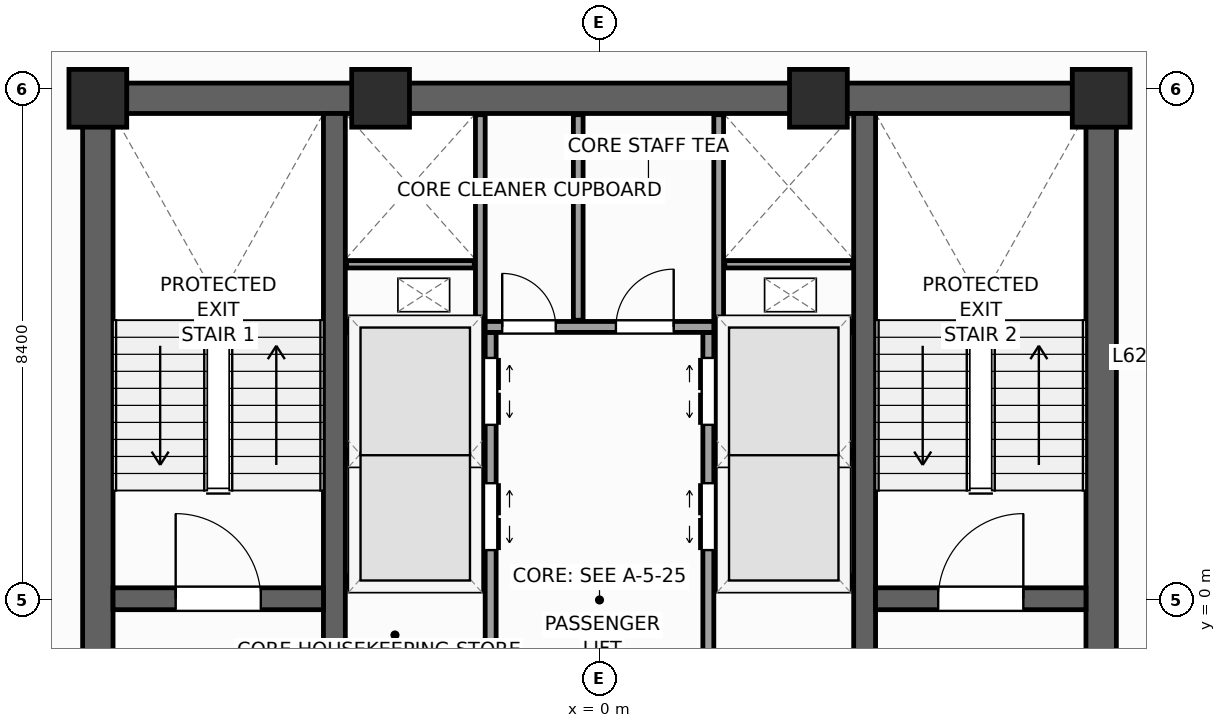
"""IFC4 building model, lengths in metres.
Left out: names, types, materials, properties, quantities, classifications, styles, units other than length and angle.
Written with IfcOpenShell. Run it as: python <this file> out.ifc"""

import sys

from ifc_helpers import new_model, si_unit, direction, frame, frame_2d, origin, origin_2d, place, context, subcontext, project, spatial, rectangle, extrude, source, transform, mapped, element, fill, save


model = new_model("IFC4")
c1 = context("Model", 3, precision=1e-05, world=origin(), true_north=direction((0.0, 1.0)))
c2 = subcontext(c1, "Body", "Model", "MODEL_VIEW")
j1 = project(units=[si_unit("LENGTHUNIT", "METRE"), si_unit("PLANEANGLEUNIT", "RADIAN")], contexts=[c1])
p1 = place(None, origin())
s1 = spatial("IfcSite", under=j1, at=p1, CompositionType="ELEMENT")
p2 = place(p1, origin())
s2 = spatial("IfcBuilding", under=s1, at=p2, CompositionType="ELEMENT")
p3 = place(p2, frame((0.0, 0.0, 256.3)))
s3 = spatial("IfcBuildingStorey", under=s2, at=p3, CompositionType="ELEMENT", Elevation=256.3)
p4 = place(p3, frame((-8.5, 8.25, 0.0), z_axis=(0.0, 0.0, 1.0), x_axis=(1.0, 0.0, 0.0)))
e1 = element("IfcWall", 1, at=p4, inside=s3, PredefinedType="SHEAR", context=c2, shape_type="SweptSolid", body=[
    extrude(rectangle(XDim=17.0, YDim=0.5, at=frame_2d((8.5, 0.0))), origin(), (0.0, 0.0, 1.0), 3.9),
])
p5 = place(p3, frame((-8.25, -8.0, 0.0), z_axis=(0.0, 0.0, 1.0), x_axis=(0.0, 1.0, 0.0)))
e2 = element("IfcWall", 2, at=p5, inside=s3, PredefinedType="SHEAR", context=c2, shape_type="SweptSolid", body=[
    extrude(rectangle(XDim=16.0, YDim=0.5, at=frame_2d((8.0, 0.0))), origin(), (0.0, 0.0, 1.0), 3.9),
])
p6 = place(p5, frame((4.69, 0.0, 0.0)))
e3 = element("IfcOpeningElement", 3, at=p6, cuts=e2, PredefinedType="OPENING", context=c2, shape_type="SweptSolid", body=[
    extrude(rectangle(XDim=1.3, YDim=2.2, at=frame_2d((0.65, 1.1))), frame((0.0, 0.26, 0.0), z_axis=(0.0, -1.0, 0.0), x_axis=(1.0, 0.0, 0.0)), (0.0, 0.0, 1.0), 0.52),
])
p7 = place(p3, frame((8.25, -8.0, 0.0), z_axis=(0.0, 0.0, 1.0), x_axis=(0.0, 1.0, 0.0)))
e4 = element("IfcWall", 4, at=p7, inside=s3, PredefinedType="SHEAR", context=c2, shape_type="SweptSolid", body=[
    extrude(rectangle(XDim=16.0, YDim=0.5, at=frame_2d((8.0, 0.0))), origin(), (0.0, 0.0, 1.0), 3.9),
])
p8 = place(p7, frame((4.69, 0.0, 0.0)))
e5 = element("IfcOpeningElement", 5, at=p8, cuts=e4, PredefinedType="OPENING", context=c2, shape_type="SweptSolid", body=[
    extrude(rectangle(XDim=1.3, YDim=2.2, at=frame_2d((0.65, 1.1))), frame((0.0, 0.26, 0.0), z_axis=(0.0, -1.0, 0.0), x_axis=(1.0, 0.0, 0.0)), (0.0, 0.0, 1.0), 0.52),
])
for number, where, z_axis, x_axis in (
    (6, (-4.36, -8.0, 0.0), (0.0, 0.0, 1.0), (0.0, 1.0, 0.0)),
    (7, (4.36, -8.0, 0.0), (0.0, 0.0, 1.0), (0.0, 1.0, 0.0)),
):
    element("IfcWall", number, at=place(p3, frame(where, z_axis=z_axis, x_axis=x_axis)), inside=s3, PredefinedType="SHEAR", context=c2, shape_type="SweptSolid", body=[
        extrude(rectangle(XDim=16.0, YDim=0.36, at=frame_2d((8.0, 0.0))), origin(), (0.0, 0.0, 1.0), 3.9),
    ])
p9 = place(p3, frame((-8.0, 0.02, 0.0), z_axis=(0.0, 0.0, 1.0), x_axis=(1.0, 0.0, 0.0)))
e8 = element("IfcWall", 8, at=p9, inside=s3, PredefinedType="SHEAR", context=c2, shape_type="SweptSolid", body=[
    extrude(rectangle(XDim=3.46, YDim=0.36, at=frame_2d((1.73, 0.0))), origin(), (0.0, 0.0, 1.0), 3.9),
])
p10 = place(p9, frame((1.03, 0.0, 0.0)))
e9 = element("IfcOpeningElement", 9, at=p10, cuts=e8, PredefinedType="OPENING", context=c2, shape_type="SweptSolid", body=[
    extrude(rectangle(XDim=1.4, YDim=2.2, at=frame_2d((0.7, 1.1))), frame((0.0, 0.19, 0.0), z_axis=(0.0, -1.0, 0.0), x_axis=(1.0, 0.0, 0.0)), (0.0, 0.0, 1.0), 0.38),
])
p11 = place(p3, frame((4.54, 0.02, 0.0), z_axis=(0.0, 0.0, 1.0), x_axis=(1.0, 0.0, 0.0)))
e10 = element("IfcWall", 10, at=p11, inside=s3, PredefinedType="SHEAR", context=c2, shape_type="SweptSolid", body=[
    extrude(rectangle(XDim=3.46, YDim=0.36, at=frame_2d((1.73, 0.0))), origin(), (0.0, 0.0, 1.0), 3.9),
])
p12 = place(p11, frame((1.03, 0.0, 0.0)))
e11 = element("IfcOpeningElement", 11, at=p12, cuts=e10, PredefinedType="OPENING", context=c2, shape_type="SweptSolid", body=[
    extrude(rectangle(XDim=1.4, YDim=2.2, at=frame_2d((0.7, 1.1))), frame((0.0, 0.19, 0.0), z_axis=(0.0, -1.0, 0.0), x_axis=(1.0, 0.0, 0.0)), (0.0, 0.0, 1.0), 0.38),
])
m1 = source(origin(), c2, "Body", "SweptSolid", [
    extrude(rectangle(XDim=0.95, YDim=0.95, at=origin_2d()), origin(), (0.0, 0.0, 1.0), 3.9),
])
for number, where, z_axis, x_axis in (
    (12, (8.25, 8.25, 0.0), (0.0, 0.0, 1.0), (1.0, 0.0, 0.0)),
    (13, (-8.25, 8.25, 0.0), (0.0, 0.0, 1.0), (1.0, 0.0, 0.0)),
    (14, (-3.6, 8.25, 0.0), (0.0, 0.0, 1.0), (1.0, 0.0, 0.0)),
    (15, (3.6, 8.25, 0.0), (0.0, 0.0, 1.0), (1.0, 0.0, 0.0)),
):
    element("IfcColumn", number, at=place(p3, frame(where, z_axis=z_axis, x_axis=x_axis)), inside=s3, PredefinedType="PILASTER", context=c2, shape_type="MappedRepresentation", body=[
        mapped(m1, transform((0.0, 0.0, 0.0), scale=1.0)),
    ])
p13 = place(p3, frame((6.733, -29.154, 0.0), z_axis=(0.0, 0.0, 1.0), x_axis=(0.629325378072, 0.77714192302, 0.0)))
e16 = element("IfcWall", 16, at=p13, inside=s3, PredefinedType="STANDARD", context=c2, shape_type="SweptSolid", body=[
    extrude(rectangle(XDim=36.84, YDim=0.34, at=frame_2d((18.42, 0.0))), origin(), (0.0, 0.0, 1.0), 2.02),
])
p14 = place(p13, frame((23.495, 0.0, 0.0)))
e17 = element("IfcOpeningElement", 17, at=p14, cuts=e16, PredefinedType="OPENING", context=c2, shape_type="SweptSolid", body=[
    extrude(rectangle(XDim=1.05, YDim=2.02, at=frame_2d((0.525, 1.01))), frame((0.0, 0.18, 0.0), z_axis=(0.0, -1.0, 0.0), x_axis=(1.0, 0.0, 0.0)), (0.0, 0.0, 1.0), 0.36),
])
p15 = place(p13, frame((3.421, 0.0, 0.49)))
e18 = element("IfcOpeningElement", 18, at=p15, cuts=e16, PredefinedType="OPENING", context=c2, shape_type="SweptSolid", body=[
    extrude(rectangle(XDim=2.0, YDim=1.45, at=frame_2d((1.0, 0.725))), frame((0.0, 0.18, 0.0), z_axis=(0.0, -1.0, 0.0), x_axis=(1.0, 0.0, 0.0)), (0.0, 0.0, 1.0), 0.36),
])
p16 = place(p13, frame((11.184, 0.0, 0.49)))
e19 = element("IfcOpeningElement", 19, at=p16, cuts=e16, PredefinedType="OPENING", context=c2, shape_type="SweptSolid", body=[
    extrude(rectangle(XDim=2.0, YDim=1.45, at=frame_2d((1.0, 0.725))), frame((0.0, 0.18, 0.0), z_axis=(0.0, -1.0, 0.0), x_axis=(1.0, 0.0, 0.0)), (0.0, 0.0, 1.0), 0.36),
])
p17 = place(p13, frame((15.183, 0.0, 0.49)))
e20 = element("IfcOpeningElement", 20, at=p17, cuts=e16, PredefinedType="OPENING", context=c2, shape_type="SweptSolid", body=[
    extrude(rectangle(XDim=2.0, YDim=1.45, at=frame_2d((1.0, 0.725))), frame((0.0, 0.18, 0.0), z_axis=(0.0, -1.0, 0.0), x_axis=(1.0, 0.0, 0.0)), (0.0, 0.0, 1.0), 0.36),
])
p18 = place(p13, frame((26.301, 0.0, 0.49)))
e21 = element("IfcOpeningElement", 21, at=p18, cuts=e16, PredefinedType="OPENING", context=c2, shape_type="SweptSolid", body=[
    extrude(rectangle(XDim=2.0, YDim=1.45, at=frame_2d((1.0, 0.725))), frame((0.0, 0.18, 0.0), z_axis=(0.0, -1.0, 0.0), x_axis=(1.0, 0.0, 0.0)), (0.0, 0.0, 1.0), 0.36),
])
p19 = place(p13, frame((30.682, 0.0, 0.49)))
e22 = element("IfcOpeningElement", 22, at=p19, cuts=e16, PredefinedType="OPENING", context=c2, shape_type="SweptSolid", body=[
    extrude(rectangle(XDim=2.0, YDim=1.45, at=frame_2d((1.0, 0.725))), frame((0.0, 0.18, 0.0), z_axis=(0.0, -1.0, 0.0), x_axis=(1.0, 0.0, 0.0)), (0.0, 0.0, 1.0), 0.36),
])
p20 = place(p3, frame((29.154, 6.733, 0.0), z_axis=(0.0, 0.0, 1.0), x_axis=(-0.77714192302, 0.629325378072, 0.0)))
e23 = element("IfcWall", 23, at=p20, inside=s3, PredefinedType="STANDARD", context=c2, shape_type="SweptSolid", body=[
    extrude(rectangle(XDim=36.84, YDim=0.34, at=frame_2d((18.42, 0.0))), origin(), (0.0, 0.0, 1.0), 2.02),
])
p21 = place(p20, frame((3.421, 0.0, 0.49)))
e24 = element("IfcOpeningElement", 24, at=p21, cuts=e23, PredefinedType="OPENING", context=c2, shape_type="SweptSolid", body=[
    extrude(rectangle(XDim=2.0, YDim=1.45, at=frame_2d((1.0, 0.725))), frame((0.0, 0.18, 0.0), z_axis=(0.0, -1.0, 0.0), x_axis=(1.0, 0.0, 0.0)), (0.0, 0.0, 1.0), 0.36),
])
p22 = place(p20, frame((9.684, 0.0, 0.49)))
e25 = element("IfcOpeningElement", 25, at=p22, cuts=e23, PredefinedType="OPENING", context=c2, shape_type="SweptSolid", body=[
    extrude(rectangle(XDim=2.0, YDim=1.45, at=frame_2d((1.0, 0.725))), frame((0.0, 0.18, 0.0), z_axis=(0.0, -1.0, 0.0), x_axis=(1.0, 0.0, 0.0)), (0.0, 0.0, 1.0), 0.36),
])
p23 = place(p20, frame((15.183, 0.0, 0.49)))
e26 = element("IfcOpeningElement", 26, at=p23, cuts=e23, PredefinedType="OPENING", context=c2, shape_type="SweptSolid", body=[
    extrude(rectangle(XDim=2.0, YDim=1.45, at=frame_2d((1.0, 0.725))), frame((0.0, 0.18, 0.0), z_axis=(0.0, -1.0, 0.0), x_axis=(1.0, 0.0, 0.0)), (0.0, 0.0, 1.0), 0.36),
])
p24 = place(p20, frame((24.051, 0.0, 0.49)))
e27 = element("IfcOpeningElement", 27, at=p24, cuts=e23, PredefinedType="OPENING", context=c2, shape_type="SweptSolid", body=[
    extrude(rectangle(XDim=2.0, YDim=1.45, at=frame_2d((1.0, 0.725))), frame((0.0, 0.18, 0.0), z_axis=(0.0, -1.0, 0.0), x_axis=(1.0, 0.0, 0.0)), (0.0, 0.0, 1.0), 0.36),
])
p25 = place(p20, frame((31.432, 0.0, 0.49)))
e28 = element("IfcOpeningElement", 28, at=p25, cuts=e23, PredefinedType="OPENING", context=c2, shape_type="SweptSolid", body=[
    extrude(rectangle(XDim=2.0, YDim=1.45, at=frame_2d((1.0, 0.725))), frame((0.0, 0.18, 0.0), z_axis=(0.0, -1.0, 0.0), x_axis=(1.0, 0.0, 0.0)), (0.0, 0.0, 1.0), 0.36),
])
p26 = place(p3, frame((-6.733, 29.154, 0.0), z_axis=(0.0, 0.0, 1.0), x_axis=(-0.629325378072, -0.77714192302, 0.0)))
e29 = element("IfcWall", 29, at=p26, inside=s3, PredefinedType="STANDARD", context=c2, shape_type="SweptSolid", body=[
    extrude(rectangle(XDim=36.84, YDim=0.34, at=frame_2d((18.42, 0.0))), origin(), (0.0, 0.0, 1.0), 2.02),
])
p27 = place(p26, frame((23.495, 0.0, 0.0)))
e30 = element("IfcOpeningElement", 30, at=p27, cuts=e29, PredefinedType="OPENING", context=c2, shape_type="SweptSolid", body=[
    extrude(rectangle(XDim=1.05, YDim=2.02, at=frame_2d((0.525, 1.01))), frame((0.0, 0.18, 0.0), z_axis=(0.0, -1.0, 0.0), x_axis=(1.0, 0.0, 0.0)), (0.0, 0.0, 1.0), 0.36),
])
p28 = place(p26, frame((3.421, 0.0, 0.49)))
e31 = element("IfcOpeningElement", 31, at=p28, cuts=e29, PredefinedType="OPENING", context=c2, shape_type="SweptSolid", body=[
    extrude(rectangle(XDim=2.0, YDim=1.45, at=frame_2d((1.0, 0.725))), frame((0.0, 0.18, 0.0), z_axis=(0.0, -1.0, 0.0), x_axis=(1.0, 0.0, 0.0)), (0.0, 0.0, 1.0), 0.36),
])
p29 = place(p26, frame((11.184, 0.0, 0.49)))
e32 = element("IfcOpeningElement", 32, at=p29, cuts=e29, PredefinedType="OPENING", context=c2, shape_type="SweptSolid", body=[
    extrude(rectangle(XDim=2.0, YDim=1.45, at=frame_2d((1.0, 0.725))), frame((0.0, 0.18, 0.0), z_axis=(0.0, -1.0, 0.0), x_axis=(1.0, 0.0, 0.0)), (0.0, 0.0, 1.0), 0.36),
])
p30 = place(p26, frame((15.183, 0.0, 0.49)))
e33 = element("IfcOpeningElement", 33, at=p30, cuts=e29, PredefinedType="OPENING", context=c2, shape_type="SweptSolid", body=[
    extrude(rectangle(XDim=2.0, YDim=1.45, at=frame_2d((1.0, 0.725))), frame((0.0, 0.18, 0.0), z_axis=(0.0, -1.0, 0.0), x_axis=(1.0, 0.0, 0.0)), (0.0, 0.0, 1.0), 0.36),
])
p31 = place(p26, frame((26.301, 0.0, 0.49)))
e34 = element("IfcOpeningElement", 34, at=p31, cuts=e29, PredefinedType="OPENING", context=c2, shape_type="SweptSolid", body=[
    extrude(rectangle(XDim=2.0, YDim=1.45, at=frame_2d((1.0, 0.725))), frame((0.0, 0.18, 0.0), z_axis=(0.0, -1.0, 0.0), x_axis=(1.0, 0.0, 0.0)), (0.0, 0.0, 1.0), 0.36),
])
p32 = place(p26, frame((29.182, 0.0, 0.49)))
e35 = element("IfcOpeningElement", 35, at=p32, cuts=e29, PredefinedType="OPENING", context=c2, shape_type="SweptSolid", body=[
    extrude(rectangle(XDim=2.0, YDim=1.45, at=frame_2d((1.0, 0.725))), frame((0.0, 0.18, 0.0), z_axis=(0.0, -1.0, 0.0), x_axis=(1.0, 0.0, 0.0)), (0.0, 0.0, 1.0), 0.36),
])
p33 = place(p3, frame((-1.79, -7.98, 0.0), z_axis=(0.0, 0.0, 1.0), x_axis=(0.0, 1.0, 0.0)))
e36 = element("IfcWall", 36, at=p33, inside=s3, PredefinedType="PARTITIONING", context=c2, shape_type="SweptSolid", body=[
    extrude(rectangle(XDim=12.38, YDim=0.18, at=frame_2d((6.19, 0.0))), origin(), (0.0, 0.0, 1.0), 3.5),
])
p34 = place(p33, frame((8.8, 0.0, 0.0)))
e37 = element("IfcOpeningElement", 37, at=p34, cuts=e36, PredefinedType="OPENING", context=c2, shape_type="SweptSolid", body=[
    extrude(rectangle(XDim=1.1, YDim=2.2, at=frame_2d((0.55, 1.1))), frame((0.0, 0.1, 0.0), z_axis=(0.0, -1.0, 0.0), x_axis=(1.0, 0.0, 0.0)), (0.0, 0.0, 1.0), 0.2),
])
p35 = place(p33, frame((10.86, 0.0, 0.0)))
e38 = element("IfcOpeningElement", 38, at=p35, cuts=e36, PredefinedType="OPENING", context=c2, shape_type="SweptSolid", body=[
    extrude(rectangle(XDim=1.1, YDim=2.2, at=frame_2d((0.55, 1.1))), frame((0.0, 0.1, 0.0), z_axis=(0.0, -1.0, 0.0), x_axis=(1.0, 0.0, 0.0)), (0.0, 0.0, 1.0), 0.2),
])
p36 = place(p33, frame((1.4, 0.0, 0.0)))
e39 = element("IfcOpeningElement", 39, at=p36, cuts=e36, PredefinedType="OPENING", context=c2, shape_type="SweptSolid", body=[
    extrude(rectangle(XDim=1.15, YDim=2.25, at=frame_2d((0.575, 1.125))), frame((0.0, 0.1, 0.0), z_axis=(0.0, -1.0, 0.0), x_axis=(1.0, 0.0, 0.0)), (0.0, 0.0, 1.0), 0.2),
])
p37 = place(p33, frame((5.6, 0.0, 0.0)))
e40 = element("IfcOpeningElement", 40, at=p37, cuts=e36, PredefinedType="OPENING", context=c2, shape_type="SweptSolid", body=[
    extrude(rectangle(XDim=1.15, YDim=2.25, at=frame_2d((0.575, 1.125))), frame((0.0, 0.1, 0.0), z_axis=(0.0, -1.0, 0.0), x_axis=(1.0, 0.0, 0.0)), (0.0, 0.0, 1.0), 0.2),
])
p38 = place(p3, frame((1.79, -7.98, 0.0), z_axis=(0.0, 0.0, 1.0), x_axis=(0.0, 1.0, 0.0)))
e41 = element("IfcWall", 41, at=p38, inside=s3, PredefinedType="PARTITIONING", context=c2, shape_type="SweptSolid", body=[
    extrude(rectangle(XDim=12.38, YDim=0.18, at=frame_2d((6.19, 0.0))), origin(), (0.0, 0.0, 1.0), 3.5),
])
p39 = place(p38, frame((8.8, 0.0, 0.0)))
e42 = element("IfcOpeningElement", 42, at=p39, cuts=e41, PredefinedType="OPENING", context=c2, shape_type="SweptSolid", body=[
    extrude(rectangle(XDim=1.1, YDim=2.2, at=frame_2d((0.55, 1.1))), frame((0.0, 0.1, 0.0), z_axis=(0.0, -1.0, 0.0), x_axis=(1.0, 0.0, 0.0)), (0.0, 0.0, 1.0), 0.2),
])
p40 = place(p38, frame((10.86, 0.0, 0.0)))
e43 = element("IfcOpeningElement", 43, at=p40, cuts=e41, PredefinedType="OPENING", context=c2, shape_type="SweptSolid", body=[
    extrude(rectangle(XDim=1.1, YDim=2.2, at=frame_2d((0.55, 1.1))), frame((0.0, 0.1, 0.0), z_axis=(0.0, -1.0, 0.0), x_axis=(1.0, 0.0, 0.0)), (0.0, 0.0, 1.0), 0.2),
])
p41 = place(p38, frame((3.5, 0.0, 0.0)))
e44 = element("IfcOpeningElement", 44, at=p41, cuts=e41, PredefinedType="OPENING", context=c2, shape_type="SweptSolid", body=[
    extrude(rectangle(XDim=1.15, YDim=2.25, at=frame_2d((0.575, 1.125))), frame((0.0, 0.1, 0.0), z_axis=(0.0, -1.0, 0.0), x_axis=(1.0, 0.0, 0.0)), (0.0, 0.0, 1.0), 0.2),
])
p42 = place(p3, frame((-1.88, 4.49, 0.0), z_axis=(0.0, 0.0, 1.0), x_axis=(1.0, 0.0, 0.0)))
e45 = element("IfcWall", 45, at=p42, inside=s3, PredefinedType="PARTITIONING", context=c2, shape_type="SweptSolid", body=[
    extrude(rectangle(XDim=3.76, YDim=0.18, at=frame_2d((1.88, 0.0))), origin(), (0.0, 0.0, 1.0), 3.5),
])
p43 = place(p42, frame((0.28, 0.0, 0.0)))
e46 = element("IfcOpeningElement", 46, at=p43, cuts=e45, PredefinedType="OPENING", context=c2, shape_type="SweptSolid", body=[
    extrude(rectangle(XDim=0.88, YDim=2.1, at=frame_2d((0.44, 1.05))), frame((0.0, 0.1, 0.0), z_axis=(0.0, -1.0, 0.0), x_axis=(1.0, 0.0, 0.0)), (0.0, 0.0, 1.0), 0.2),
])
p44 = place(p42, frame((2.15, 0.0, 0.0)))
e47 = element("IfcOpeningElement", 47, at=p44, cuts=e45, PredefinedType="OPENING", context=c2, shape_type="SweptSolid", body=[
    extrude(rectangle(XDim=0.95, YDim=2.1, at=frame_2d((0.475, 1.05))), frame((0.0, 0.1, 0.0), z_axis=(0.0, -1.0, 0.0), x_axis=(1.0, 0.0, 0.0)), (0.0, 0.0, 1.0), 0.2),
])
for number, where, z_axis, x_axis in (
    (48, (-4.17, 0.3, 0.0), (0.0, 0.0, 1.0), (1.0, 0.0, 0.0)),
    (49, (1.89, 0.3, 0.0), (0.0, 0.0, 1.0), (1.0, 0.0, 0.0)),
    (50, (-4.17, 4.49, 0.0), (0.0, 0.0, 1.0), (1.0, 0.0, 0.0)),
    (51, (1.89, 4.49, 0.0), (0.0, 0.0, 1.0), (1.0, 0.0, 0.0)),
):
    element("IfcWall", number, at=place(p3, frame(where, z_axis=z_axis, x_axis=x_axis)), inside=s3, PredefinedType="PARTITIONING", context=c2, shape_type="SweptSolid", body=[
        extrude(rectangle(XDim=2.28, YDim=0.18, at=frame_2d((1.14, 0.0))), origin(), (0.0, 0.0, 1.0), 3.5),
    ])
for number, where, z_axis, x_axis in (
    (52, (-4.16, 2.4, 0.0), (0.0, 0.0, 1.0), (1.0, 0.0, 0.0)),
    (53, (1.9, 2.4, 0.0), (0.0, 0.0, 1.0), (1.0, 0.0, 0.0)),
):
    element("IfcWall", number, at=place(p3, frame(where, z_axis=z_axis, x_axis=x_axis)), inside=s3, PredefinedType="PARTITIONING", context=c2, shape_type="SweptSolid", body=[
        extrude(rectangle(XDim=2.26, YDim=0.12, at=frame_2d((1.13, 0.0))), origin(), (0.0, 0.0, 1.0), 3.5),
    ])
for number, where, z_axis, x_axis in (
    (54, (-1.96, 4.58, 0.0), (0.0, 0.0, 1.0), (0.0, 1.0, 0.0)),
    (55, (1.96, 4.58, 0.0), (0.0, 0.0, 1.0), (0.0, 1.0, 0.0)),
):
    element("IfcWall", number, at=place(p3, frame(where, z_axis=z_axis, x_axis=x_axis)), inside=s3, PredefinedType="PARTITIONING", context=c2, shape_type="SweptSolid", body=[
        extrude(rectangle(XDim=3.4, YDim=0.16, at=frame_2d((1.7, 0.0))), origin(), (0.0, 0.0, 1.0), 3.5),
    ])
for number, where, z_axis, x_axis in (
    (56, (-4.16, 5.52, 0.0), (0.0, 0.0, 1.0), (1.0, 0.0, 0.0)),
    (57, (2.06, 5.52, 0.0), (0.0, 0.0, 1.0), (1.0, 0.0, 0.0)),
):
    element("IfcWall", number, at=place(p3, frame(where, z_axis=z_axis, x_axis=x_axis)), inside=s3, PredefinedType="PARTITIONING", context=c2, shape_type="SweptSolid", body=[
        extrude(rectangle(XDim=2.1, YDim=0.12, at=frame_2d((1.05, 0.0))), origin(), (0.0, 0.0, 1.0), 3.5),
    ])
p45 = place(p3, frame((-0.35, 4.6, 0.0), z_axis=(0.0, 0.0, 1.0), x_axis=(0.0, 1.0, 0.0)))
e58 = element("IfcWall", 58, at=p45, inside=s3, PredefinedType="PARTITIONING", context=c2, shape_type="SweptSolid", body=[
    extrude(rectangle(XDim=3.38, YDim=0.16, at=frame_2d((1.69, 0.0))), origin(), (0.0, 0.0, 1.0), 3.5),
])
m2 = source(origin(), c2, "Body", "SweptSolid", [
    extrude(rectangle(XDim=1.4, YDim=2.2, at=frame_2d((0.7, 1.1))), frame((0.0, 0.025, 0.0), z_axis=(0.0, -1.0, 0.0), x_axis=(1.0, 0.0, 0.0)), (0.0, 0.0, 1.0), 0.05),
])
p46 = place(p10, origin())
e59 = element("IfcDoor", 59, at=p46, inside=s3, OperationType="SINGLE_SWING_LEFT", PredefinedType="DOOR", context=c2, shape_type="MappedRepresentation", body=[
    mapped(m2, transform((0.0, 0.0, 0.0), scale=1.0)),
])
fill(e9, e59)
p47 = place(p12, origin())
e60 = element("IfcDoor", 60, at=p47, inside=s3, OperationType="SINGLE_SWING_RIGHT", PredefinedType="DOOR", context=c2, shape_type="MappedRepresentation", body=[
    mapped(m2, transform((0.0, 0.0, 0.0), scale=1.0)),
])
fill(e11, e60)
m3 = source(origin(), c2, "Body", "SweptSolid", [
    extrude(rectangle(XDim=1.1, YDim=2.2, at=frame_2d((0.55, 1.1))), frame((0.0, 0.025, 0.0), z_axis=(0.0, -1.0, 0.0), x_axis=(1.0, 0.0, 0.0)), (0.0, 0.0, 1.0), 0.05),
])
p48 = place(p34, frame((1.1, 0.0, 0.0), z_axis=(0.0, 0.0, 1.0), x_axis=(-1.0, 0.0, 0.0)))
e61 = element("IfcDoor", 61, at=p48, inside=s3, OperationType="DOUBLE_DOOR_SLIDING", PredefinedType="DOOR", context=c2, shape_type="MappedRepresentation", body=[
    mapped(m3, transform((0.0, 0.0, 0.0), scale=1.0)),
])
fill(e37, e61)
p49 = place(p35, frame((1.1, 0.0, 0.0), z_axis=(0.0, 0.0, 1.0), x_axis=(-1.0, 0.0, 0.0)))
e62 = element("IfcDoor", 62, at=p49, inside=s3, OperationType="DOUBLE_DOOR_SLIDING", PredefinedType="DOOR", context=c2, shape_type="MappedRepresentation", body=[
    mapped(m3, transform((0.0, 0.0, 0.0), scale=1.0)),
])
fill(e38, e62)
p50 = place(p39, origin())
e63 = element("IfcDoor", 63, at=p50, inside=s3, OperationType="DOUBLE_DOOR_SLIDING", PredefinedType="DOOR", context=c2, shape_type="MappedRepresentation", body=[
    mapped(m3, transform((0.0, 0.0, 0.0), scale=1.0)),
])
fill(e42, e63)
p51 = place(p40, origin())
e64 = element("IfcDoor", 64, at=p51, inside=s3, OperationType="DOUBLE_DOOR_SLIDING", PredefinedType="DOOR", context=c2, shape_type="MappedRepresentation", body=[
    mapped(m3, transform((0.0, 0.0, 0.0), scale=1.0)),
])
fill(e43, e64)
m4 = source(origin(), c2, "Body", "SweptSolid", [
    extrude(rectangle(XDim=0.88, YDim=2.1, at=frame_2d((0.44, 1.05))), frame((0.0, 0.025, 0.0), z_axis=(0.0, -1.0, 0.0), x_axis=(1.0, 0.0, 0.0)), (0.0, 0.0, 1.0), 0.05),
])
p52 = place(p43, origin())
e65 = element("IfcDoor", 65, at=p52, inside=s3, OperationType="SINGLE_SWING_LEFT", PredefinedType="DOOR", context=c2, shape_type="MappedRepresentation", body=[
    mapped(m4, transform((0.0, 0.0, 0.0), scale=1.0)),
])
fill(e46, e65)
m5 = source(origin(), c2, "Body", "SweptSolid", [
    extrude(rectangle(XDim=0.95, YDim=2.1, at=frame_2d((0.475, 1.05))), frame((0.0, 0.025, 0.0), z_axis=(0.0, -1.0, 0.0), x_axis=(1.0, 0.0, 0.0)), (0.0, 0.0, 1.0), 0.05),
])
p53 = place(p44, origin())
e66 = element("IfcDoor", 66, at=p53, inside=s3, OperationType="SINGLE_SWING_RIGHT", PredefinedType="DOOR", context=c2, shape_type="MappedRepresentation", body=[
    mapped(m5, transform((0.0, 0.0, 0.0), scale=1.0)),
])
fill(e47, e66)
save(model, sys.argv[1])
